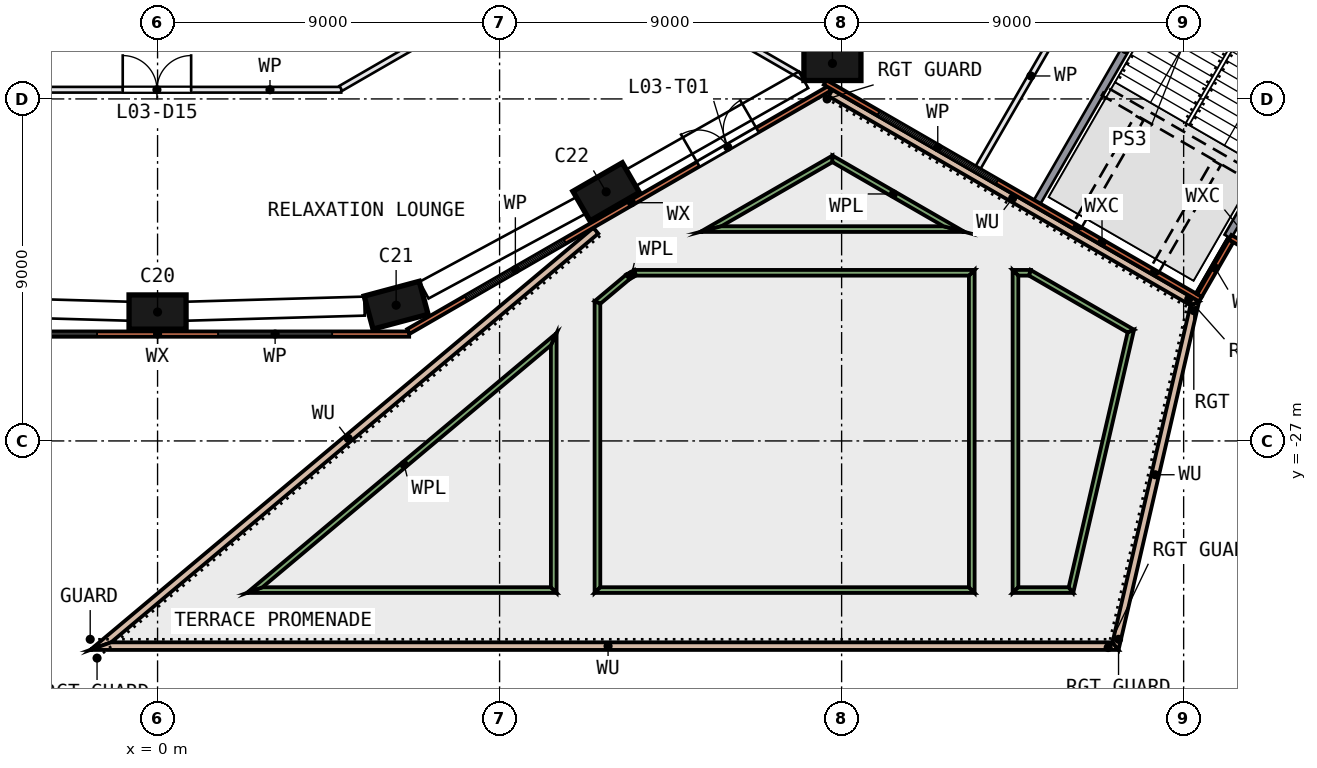
"""IFC4 building model, lengths in metres.
Left out: names, types, materials, properties, quantities, classifications, styles, units other than length and angle.
Written with IfcOpenShell. Run it as: python <this file> out.ifc"""

import sys

from ifc_helpers import new_model, si_unit, direction, frame, frame_2d, origin, origin_2d, place, context, subcontext, project, spatial, polyline, rectangle, outline, extrude, element, fill, save


model = new_model("IFC4")
c1 = context("Model", 3, precision=1e-05, world=origin(), true_north=direction((0.0, 1.0)))
c2 = subcontext(c1, "Body", "Model", "MODEL_VIEW")
j1 = project(units=[si_unit("LENGTHUNIT", "METRE"), si_unit("PLANEANGLEUNIT", "RADIAN")], contexts=[c1])
p1 = place(None, origin())
s1 = spatial("IfcSite", under=j1, at=p1, CompositionType="ELEMENT")
p2 = place(p1, origin())
s2 = spatial("IfcBuilding", under=s1, at=p2, CompositionType="ELEMENT")
p3 = place(p2, frame((0.0, 0.0, 19.0)))
s3 = spatial("IfcBuildingStorey", under=s2, at=p3, CompositionType="ELEMENT", Elevation=19.0)
for number, where, z_axis, x_axis in (
    (1, (0.0, -23.608, 0.0), (0.0, 0.0, 1.0), (1.0, 0.0, 0.0)),
    (2, (6.278, -23.428, 0.0), (0.0, 0.0, 1.0), (-0.966, -0.259, 0.0)),
    (3, (11.804, -20.445, 0.0), (0.0, 0.0, 1.0), (0.866, 0.5, 0.0)),
    (4, (17.758, -17.065, 0.0), (0.0, 0.0, 1.0), (-1.0, 0.0, 0.0)),
):
    element("IfcColumn", number, at=place(p3, frame(where, z_axis=z_axis, x_axis=x_axis)), inside=s3, PredefinedType="COLUMN", context=c2, shape_type="SweptSolid", body=[
        extrude(rectangle(XDim=1.5, YDim=0.9, at=origin_2d()), origin(), (0.0, 0.0, 1.0), 4.05),
    ])
p4 = place(p3, frame((-6.341, -24.188, 0.0), z_axis=(0.0, 0.0, 1.0), x_axis=(1.0, 0.0, 0.0)))
e5 = element("IfcWall", 5, at=p4, inside=s3, PredefinedType="SOLIDWALL", context=c2, shape_type="SweptSolid", body=[
    extrude(rectangle(XDim=12.962, YDim=0.14, at=frame_2d((6.481, 0.0))), origin(), (0.0, 0.0, 1.0), 4.05),
])
p5 = place(p4, frame((1.748, 0.0, 0.9)))
e6 = element("IfcOpeningElement", 6, at=p5, cuts=e5, PredefinedType="OPENING", context=c2, shape_type="SweptSolid", body=[
    extrude(rectangle(XDim=3.0, YDim=2.4, at=frame_2d((1.5, 1.2))), frame((0.0, 0.08, 0.0), z_axis=(0.0, -1.0, 0.0), x_axis=(1.0, 0.0, 0.0)), (0.0, 0.0, 1.0), 0.16),
])
p6 = place(p4, frame((7.935, 0.0, 0.9)))
e7 = element("IfcOpeningElement", 7, at=p6, cuts=e5, PredefinedType="OPENING", context=c2, shape_type="SweptSolid", body=[
    extrude(rectangle(XDim=3.0, YDim=2.4, at=frame_2d((1.5, 1.2))), frame((0.0, 0.08, 0.0), z_axis=(0.0, -1.0, 0.0), x_axis=(1.0, 0.0, 0.0)), (0.0, 0.0, 1.0), 0.16),
])
p7 = place(p3, frame((6.603, -24.118, 0.0), z_axis=(0.0, 0.0, 1.0), x_axis=(0.866023287, 0.500003667, 0.0)))
e8 = element("IfcWall", 8, at=p7, inside=s3, PredefinedType="SOLIDWALL", context=c2, shape_type="SweptSolid", body=[
    extrude(rectangle(XDim=12.801, YDim=0.14, at=frame_2d((6.4, 0.0))), origin(), (0.0, 0.0, 1.0), 4.05),
])
p8 = place(p7, frame((1.748, 0.0, 0.9)))
e9 = element("IfcOpeningElement", 9, at=p8, cuts=e8, PredefinedType="OPENING", context=c2, shape_type="SweptSolid", body=[
    extrude(rectangle(XDim=3.0, YDim=2.4, at=frame_2d((1.5, 1.2))), frame((0.0, 0.08, 0.0), z_axis=(0.0, -1.0, 0.0), x_axis=(1.0, 0.0, 0.0)), (0.0, 0.0, 1.0), 0.16),
])
p9 = place(p7, frame((8.802, 0.0, 0.0)))
e10 = element("IfcOpeningElement", 10, at=p9, cuts=e8, PredefinedType="OPENING", context=c2, shape_type="SweptSolid", body=[
    extrude(rectangle(XDim=1.8, YDim=2.4, at=frame_2d((0.9, 1.2))), frame((0.0, 0.08, 0.0), z_axis=(0.0, -1.0, 0.0), x_axis=(1.0, 0.0, 0.0)), (0.0, 0.0, 1.0), 0.16),
])
p10 = place(p3, frame((17.565, -17.566, 0.0), z_axis=(0.0, 0.0, 1.0), x_axis=(0.866028022, -0.499995465, 0.0)))
e11 = element("IfcWall", 11, at=p10, inside=s3, PredefinedType="SOLIDWALL", context=c2, shape_type="SweptSolid", body=[
    extrude(rectangle(XDim=11.405, YDim=0.14, at=frame_2d((5.702, 0.0))), origin(), (0.0, 0.0, 1.0), 4.05),
])
p11 = place(p10, frame((1.623, 0.0, 0.9)))
e12 = element("IfcOpeningElement", 12, at=p11, cuts=e11, PredefinedType="OPENING", context=c2, shape_type="SweptSolid", body=[
    extrude(rectangle(XDim=3.6, YDim=2.4, at=frame_2d((1.8, 1.2))), frame((0.0, 0.08, 0.0), z_axis=(0.0, -1.0, 0.0), x_axis=(1.0, 0.0, 0.0)), (0.0, 0.0, 1.0), 0.16),
])
p12 = place(p3, frame((27.417, -23.173, 0.0), z_axis=(0.0, 0.0, 1.0), x_axis=(0.499951638, 0.866053324, 0.0)))
e13 = element("IfcWall", 13, at=p12, inside=s3, PredefinedType="SOLIDWALL", context=c2, shape_type="SweptSolid", body=[
    extrude(rectangle(XDim=1.66, YDim=0.14, at=frame_2d((0.83, 0.0))), origin(), (0.0, 0.0, 1.0), 4.05),
])
p13 = place(p3, frame((28.221, -21.64, 0.0), z_axis=(0.0, 0.0, 1.0), x_axis=(0.866011627, -0.500023862, 0.0)))
e14 = element("IfcWall", 14, at=p13, inside=s3, PredefinedType="SOLIDWALL", context=c2, shape_type="SweptSolid", body=[
    extrude(rectangle(XDim=1.94, YDim=0.14, at=frame_2d((0.97, 0.0))), origin(), (0.0, 0.0, 1.0), 4.05),
])
p14 = place(p3, origin())
e15 = element("IfcWall", 15, at=p14, inside=s3, PredefinedType="SOLIDWALL", context=c2, shape_type="SweptSolid", body=[
    extrude(outline(polyline([(11.596, -21.543), (11.468, -21.39), (-1.772, -32.5), (-1.223, -32.3), (11.596, -21.543)])), origin(), (0.0, 0.0, 1.0), 0.45),
])
p15 = place(p3, origin())
e16 = element("IfcWall", 16, at=p15, inside=s3, PredefinedType="SOLIDWALL", context=c2, shape_type="SweptSolid", body=[
    extrude(outline(polyline([(-1.223, -32.3), (-1.772, -32.5), (25.287, -32.5), (25.128, -32.3), (-1.223, -32.3)])), origin(), (0.0, 0.0, 1.0), 0.45),
])
p16 = place(p3, origin())
e17 = element("IfcWall", 17, at=p16, inside=s3, PredefinedType="SOLIDWALL", context=c2, shape_type="SweptSolid", body=[
    extrude(outline(polyline([(25.128, -32.3), (25.287, -32.5), (27.407, -23.329), (27.179, -23.428), (25.128, -32.3)])), origin(), (0.0, 0.0, 1.0), 0.45),
])
p17 = place(p3, origin())
e18 = element("IfcWall", 18, at=p17, inside=s3, PredefinedType="SOLIDWALL", context=c2, shape_type="SweptSolid", body=[
    extrude(outline(polyline([(27.179, -23.428), (27.407, -23.329), (17.758, -17.758), (17.658, -17.931), (27.179, -23.428)])), origin(), (0.0, 0.0, 1.0), 0.45),
])
p18 = place(p3, origin())
e19 = element("IfcWall", 19, at=p18, inside=s3, PredefinedType="SOLIDWALL", context=c2, shape_type="SweptSolid", body=[
    extrude(outline(polyline([(12.545, -22.5), (12.332, -22.624), (12.418, -22.747), (12.586, -22.65), (12.545, -22.5)])), origin(), (0.0, 0.0, 1.0), 0.6),
])
p19 = place(p3, origin())
e20 = element("IfcWall", 20, at=p19, inside=s3, PredefinedType="SOLIDWALL", context=c2, shape_type="SweptSolid", body=[
    extrude(outline(polyline([(12.332, -22.624), (11.5, -23.321), (11.65, -23.391), (12.418, -22.747), (12.332, -22.624)])), origin(), (0.0, 0.0, 1.0), 0.6),
])
p20 = place(p3, origin())
e21 = element("IfcWall", 21, at=p20, inside=s3, PredefinedType="SOLIDWALL", context=c2, shape_type="SweptSolid", body=[
    extrude(outline(polyline([(11.5, -23.321), (11.5, -31.0), (11.65, -30.85), (11.65, -23.391), (11.5, -23.321)])), origin(), (0.0, 0.0, 1.0), 0.6),
])
p21 = place(p3, origin())
e22 = element("IfcWall", 22, at=p21, inside=s3, PredefinedType="SOLIDWALL", context=c2, shape_type="SweptSolid", body=[
    extrude(outline(polyline([(11.5, -31.0), (21.5, -31.0), (21.35, -30.85), (11.65, -30.85), (11.5, -31.0)])), origin(), (0.0, 0.0, 1.0), 0.6),
])
p22 = place(p3, origin())
e23 = element("IfcWall", 23, at=p22, inside=s3, PredefinedType="SOLIDWALL", context=c2, shape_type="SweptSolid", body=[
    extrude(outline(polyline([(21.5, -31.0), (21.5, -22.5), (21.35, -22.65), (21.35, -30.85), (21.5, -31.0)])), origin(), (0.0, 0.0, 1.0), 0.6),
])
p23 = place(p3, origin())
e24 = element("IfcWall", 24, at=p23, inside=s3, PredefinedType="SOLIDWALL", context=c2, shape_type="SweptSolid", body=[
    extrude(outline(polyline([(21.5, -22.5), (12.545, -22.5), (12.586, -22.65), (21.35, -22.65), (21.5, -22.5)])), origin(), (0.0, 0.0, 1.0), 0.6),
])
p24 = place(p3, origin())
e25 = element("IfcWall", 25, at=p24, inside=s3, PredefinedType="SOLIDWALL", context=c2, shape_type="SweptSolid", body=[
    extrude(outline(polyline([(17.758, -19.49), (14.278, -21.5), (14.837, -21.35), (17.758, -19.664), (17.758, -19.49)])), origin(), (0.0, 0.0, 1.0), 0.6),
])
p25 = place(p3, origin())
e26 = element("IfcWall", 26, at=p25, inside=s3, PredefinedType="SOLIDWALL", context=c2, shape_type="SweptSolid", body=[
    extrude(outline(polyline([(14.278, -21.5), (21.239, -21.5), (20.679, -21.35), (14.837, -21.35), (14.278, -21.5)])), origin(), (0.0, 0.0, 1.0), 0.6),
])
p26 = place(p3, origin())
e27 = element("IfcWall", 27, at=p26, inside=s3, PredefinedType="SOLIDWALL", context=c2, shape_type="SweptSolid", body=[
    extrude(outline(polyline([(21.239, -21.5), (17.758, -19.49), (17.758, -19.664), (20.679, -21.35), (21.239, -21.5)])), origin(), (0.0, 0.0, 1.0), 0.6),
])
p27 = place(p3, origin())
e28 = element("IfcWall", 28, at=p27, inside=s3, PredefinedType="SOLIDWALL", context=c2, shape_type="SweptSolid", body=[
    extrude(outline(polyline([(25.696, -24.073), (22.971, -22.5), (22.931, -22.65), (25.525, -24.147), (25.696, -24.073)])), origin(), (0.0, 0.0, 1.0), 0.6),
])
p28 = place(p3, origin())
e29 = element("IfcWall", 29, at=p28, inside=s3, PredefinedType="SOLIDWALL", context=c2, shape_type="SweptSolid", body=[
    extrude(outline(polyline([(22.971, -22.5), (22.5, -22.5), (22.65, -22.65), (22.931, -22.65), (22.971, -22.5)])), origin(), (0.0, 0.0, 1.0), 0.6),
])
p29 = place(p3, origin())
e30 = element("IfcWall", 30, at=p29, inside=s3, PredefinedType="SOLIDWALL", context=c2, shape_type="SweptSolid", body=[
    extrude(outline(polyline([(22.5, -22.5), (22.5, -31.0), (22.65, -30.85), (22.65, -22.65), (22.5, -22.5)])), origin(), (0.0, 0.0, 1.0), 0.6),
])
p30 = place(p3, origin())
e31 = element("IfcWall", 31, at=p30, inside=s3, PredefinedType="SOLIDWALL", context=c2, shape_type="SweptSolid", body=[
    extrude(outline(polyline([(22.5, -31.0), (24.094, -31.0), (23.975, -30.85), (22.65, -30.85), (22.5, -31.0)])), origin(), (0.0, 0.0, 1.0), 0.6),
])
p31 = place(p3, origin())
e32 = element("IfcWall", 32, at=p31, inside=s3, PredefinedType="SOLIDWALL", context=c2, shape_type="SweptSolid", body=[
    extrude(outline(polyline([(24.094, -31.0), (25.696, -24.073), (25.525, -24.147), (23.975, -30.85), (24.094, -31.0)])), origin(), (0.0, 0.0, 1.0), 0.6),
])
p32 = place(p3, origin())
e33 = element("IfcWall", 33, at=p32, inside=s3, PredefinedType="SOLIDWALL", context=c2, shape_type="SweptSolid", body=[
    extrude(outline(polyline([(2.349, -31.0), (10.5, -31.0), (10.35, -30.85), (2.761, -30.85), (2.349, -31.0)])), origin(), (0.0, 0.0, 1.0), 0.6),
])
p33 = place(p3, origin())
e34 = element("IfcWall", 34, at=p33, inside=s3, PredefinedType="SOLIDWALL", context=c2, shape_type="SweptSolid", body=[
    extrude(outline(polyline([(10.5, -31.0), (10.5, -24.16), (10.35, -24.482), (10.35, -30.85), (10.5, -31.0)])), origin(), (0.0, 0.0, 1.0), 0.6),
])
p34 = place(p3, origin())
e35 = element("IfcWall", 35, at=p34, inside=s3, PredefinedType="SOLIDWALL", context=c2, shape_type="SweptSolid", body=[
    extrude(outline(polyline([(10.5, -24.16), (2.349, -31.0), (2.761, -30.85), (10.35, -24.482), (10.5, -24.16)])), origin(), (0.0, 0.0, 1.0), 0.6),
])
p35 = place(p3, frame((-4.683, -17.758, 0.0), z_axis=(0.0, 0.0, 1.0), x_axis=(1.0, 0.0, 0.0)))
e36 = element("IfcWall", 36, at=p35, inside=s3, PredefinedType="PARTITIONING", context=c2, shape_type="SweptSolid", body=[
    extrude(rectangle(XDim=9.517, YDim=0.15, at=frame_2d((4.758, 0.0))), origin(), (0.0, 0.0, 1.0), 4.05),
])
p36 = place(p35, frame((3.767, 0.0, 0.0)))
e37 = element("IfcOpeningElement", 37, at=p36, cuts=e36, PredefinedType="OPENING", context=c2, shape_type="SweptSolid", body=[
    extrude(rectangle(XDim=1.8, YDim=2.1, at=frame_2d((0.9, 1.05))), frame((0.0, 0.085, 0.0), z_axis=(0.0, -1.0, 0.0), x_axis=(1.0, 0.0, 0.0)), (0.0, 0.0, 1.0), 0.17),
])
p37 = place(p3, frame((12.144, -14.633, 0.0), z_axis=(0.0, 0.0, 1.0), x_axis=(0.866016603, -0.500015243, 0.0)))
e38 = element("IfcWall", 38, at=p37, inside=s3, PredefinedType="PARTITIONING", context=c2, shape_type="SweptSolid", body=[
    extrude(rectangle(XDim=5.582, YDim=0.15, at=frame_2d((2.791, 0.0))), origin(), (0.0, 0.0, 1.0), 4.05),
])
p38 = place(p3, frame((12.935, -13.038, 0.0), z_axis=(0.0, 0.0, 1.0), x_axis=(-0.866037142, -0.499979668, 0.0)))
e39 = element("IfcWall", 39, at=p38, inside=s3, PredefinedType="PARTITIONING", context=c2, shape_type="SweptSolid", body=[
    extrude(rectangle(XDim=9.367, YDim=0.15, at=frame_2d((4.683, 0.0))), origin(), (0.0, 0.0, 1.0), 4.05),
])
p39 = place(p3, frame((28.162, -21.623, 0.0), z_axis=(0.0, 0.0, 1.0), x_axis=(0.499981072, 0.866036332, 0.0)))
e40 = element("IfcWall", 40, at=p39, inside=s3, PredefinedType="SOLIDWALL", context=c2, shape_type="SweptSolid", body=[
    extrude(rectangle(XDim=7.545, YDim=0.2, at=frame_2d((3.772, 0.0))), origin(), (0.0, 0.0, 1.0), 4.05),
])
p40 = place(p3, frame((27.777, -12.688, 0.0), z_axis=(0.0, 0.0, 1.0), x_axis=(-0.500003922, -0.866023139, 0.0)))
e41 = element("IfcWall", 41, at=p40, inside=s3, PredefinedType="SOLIDWALL", context=c2, shape_type="SweptSolid", body=[
    extrude(rectangle(XDim=9.26, YDim=0.2, at=frame_2d((4.63, 0.0))), origin(), (0.0, 0.0, 1.0), 4.05),
])
p41 = place(p3, frame((27.948, -8.792, 0.0), z_axis=(0.0, 0.0, 1.0), x_axis=(-0.499991053, -0.866030569, 0.0)))
e42 = element("IfcWall", 42, at=p41, inside=s3, PredefinedType="PARTITIONING", context=c2, shape_type="SweptSolid", body=[
    extrude(rectangle(XDim=12.72, YDim=0.15, at=frame_2d((6.36, 0.0))), origin(), (0.0, 0.0, 1.0), 4.05),
])
p42 = place(p41, frame((5.35, 0.0, 0.0)))
e43 = element("IfcOpeningElement", 43, at=p42, cuts=e42, PredefinedType="OPENING", context=c2, shape_type="SweptSolid", body=[
    extrude(rectangle(XDim=1.8, YDim=2.1, at=frame_2d((0.9, 1.05))), frame((0.0, 0.085, 0.0), z_axis=(0.0, -1.0, 0.0), x_axis=(1.0, 0.0, 0.0)), (0.0, 0.0, 1.0), 0.17),
])
p43 = place(p5, origin())
e44 = element("IfcWindow", 44, at=p43, inside=s3, PartitioningType="SINGLE_PANEL", PredefinedType="WINDOW", context=c2, shape_type="SweptSolid", body=[
    extrude(rectangle(XDim=3.0, YDim=2.4, at=frame_2d((1.5, 1.2))), frame((0.0, 0.03, 0.0), z_axis=(0.0, -1.0, 0.0), x_axis=(1.0, 0.0, 0.0)), (0.0, 0.0, 1.0), 0.06),
])
fill(e6, e44)
p44 = place(p6, origin())
e45 = element("IfcWindow", 45, at=p44, inside=s3, PartitioningType="SINGLE_PANEL", PredefinedType="WINDOW", context=c2, shape_type="SweptSolid", body=[
    extrude(rectangle(XDim=3.0, YDim=2.4, at=frame_2d((1.5, 1.2))), frame((0.0, 0.03, 0.0), z_axis=(0.0, -1.0, 0.0), x_axis=(1.0, 0.0, 0.0)), (0.0, 0.0, 1.0), 0.06),
])
fill(e7, e45)
p45 = place(p8, origin())
e46 = element("IfcWindow", 46, at=p45, inside=s3, PartitioningType="SINGLE_PANEL", PredefinedType="WINDOW", context=c2, shape_type="SweptSolid", body=[
    extrude(rectangle(XDim=3.0, YDim=2.4, at=frame_2d((1.5, 1.2))), frame((0.0, 0.03, 0.0), z_axis=(0.0, -1.0, 0.0), x_axis=(1.0, 0.0, 0.0)), (0.0, 0.0, 1.0), 0.06),
])
fill(e9, e46)
p46 = place(p9, origin())
e47 = element("IfcDoor", 47, at=p46, inside=s3, OperationType="DOUBLE_DOOR_SINGLE_SWING", PredefinedType="DOOR", context=c2, shape_type="SweptSolid", body=[
    extrude(rectangle(XDim=1.8, YDim=2.4, at=frame_2d((0.9, 1.2))), frame((0.0, 0.025, 0.0), z_axis=(0.0, -1.0, 0.0), x_axis=(1.0, 0.0, 0.0)), (0.0, 0.0, 1.0), 0.05),
])
fill(e10, e47)
p47 = place(p11, origin())
e48 = element("IfcWindow", 48, at=p47, inside=s3, PartitioningType="SINGLE_PANEL", PredefinedType="WINDOW", context=c2, shape_type="SweptSolid", body=[
    extrude(rectangle(XDim=3.6, YDim=2.4, at=frame_2d((1.8, 1.2))), frame((0.0, 0.03, 0.0), z_axis=(0.0, -1.0, 0.0), x_axis=(1.0, 0.0, 0.0)), (0.0, 0.0, 1.0), 0.06),
])
fill(e12, e48)
p48 = place(p36, origin())
e49 = element("IfcDoor", 49, at=p48, inside=s3, OperationType="DOUBLE_DOOR_SINGLE_SWING", PredefinedType="DOOR", context=c2, shape_type="SweptSolid", body=[
    extrude(rectangle(XDim=1.8, YDim=2.1, at=frame_2d((0.9, 1.05))), frame((0.0, 0.025, 0.0), z_axis=(0.0, -1.0, 0.0), x_axis=(1.0, 0.0, 0.0)), (0.0, 0.0, 1.0), 0.05),
])
fill(e37, e49)
save(model, sys.argv[1])
